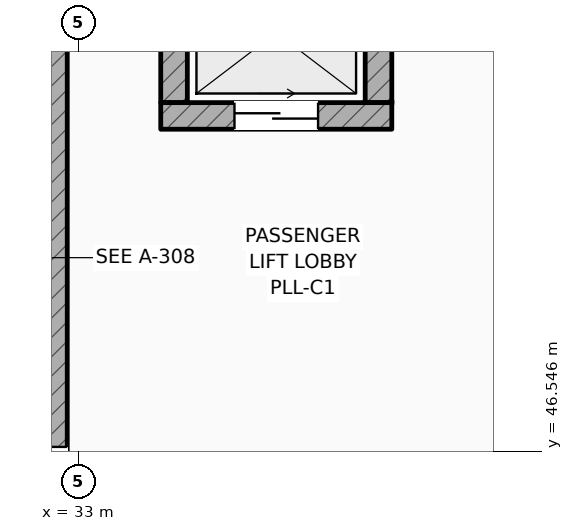
"""IFC4 building model, lengths in metres.
Left out: names, types, materials, properties, quantities, classifications, styles, units other than length and angle.
Written with IfcOpenShell. Run it as: python <this file> out.ifc"""

import sys

from ifc_helpers import new_model, si_unit, direction, frame, frame_2d, origin, place, context, subcontext, project, spatial, rectangle, extrude, element, fill, save


model = new_model("IFC4")
c1 = context("Model", 3, precision=1e-05, world=origin(), true_north=direction((0.0, 1.0)))
c2 = subcontext(c1, "Body", "Model", "MODEL_VIEW")
j1 = project(units=[si_unit("LENGTHUNIT", "METRE"), si_unit("PLANEANGLEUNIT", "RADIAN")], contexts=[c1])
p1 = place(None, origin())
s1 = spatial("IfcSite", under=j1, at=p1, CompositionType="ELEMENT")
p2 = place(p1, origin())
s2 = spatial("IfcBuilding", under=s1, at=p2, CompositionType="ELEMENT")
p3 = place(p2, frame((0.0, 0.0, -4.5)))
s3 = spatial("IfcBuildingStorey", under=s2, at=p3, CompositionType="ELEMENT", Elevation=-4.5)
p4 = place(p3, frame((32.675, 44.75, 0.0), z_axis=(0.0, 0.0, 1.0), x_axis=(0.0, 1.0, 0.0)))
e1 = element("IfcWall", 1, at=p4, inside=s3, PredefinedType="SHEAR", context=c2, shape_type="SweptSolid", body=[
    extrude(rectangle(XDim=8.68, YDim=0.35, at=frame_2d((4.34, 0.0))), origin(), (0.0, 0.0, 1.0), 4.5),
])
p5 = place(p4, frame((0.25, 0.0, 0.0)))
e2 = element("IfcOpeningElement", 2, at=p5, cuts=e1, PredefinedType="OPENING", context=c2, shape_type="SweptSolid", body=[
    extrude(rectangle(XDim=1.6, YDim=2.2, at=frame_2d((0.8, 1.1))), frame((0.0, 0.185, 0.0), z_axis=(0.0, -1.0, 0.0), x_axis=(1.0, 0.0, 0.0)), (0.0, 0.0, 1.0), 0.37),
])
p6 = place(p3, frame((34.08, 50.955, 0.0), z_axis=(0.0, 0.0, 1.0), x_axis=(1.0, 0.0, 0.0)))
e3 = element("IfcWall", 3, at=p6, inside=s3, PredefinedType="SHEAR", context=c2, shape_type="SweptSolid", body=[
    extrude(rectangle(XDim=3.04, YDim=0.35, at=frame_2d((1.52, 0.0))), origin(), (0.0, 0.0, 1.0), 4.1),
])
p7 = place(p6, frame((0.97, 0.0, 0.0)))
e4 = element("IfcOpeningElement", 4, at=p7, cuts=e3, PredefinedType="OPENING", context=c2, shape_type="SweptSolid", body=[
    extrude(rectangle(XDim=1.1, YDim=2.2, at=frame_2d((0.55, 1.1))), frame((0.0, 0.185, 0.0), z_axis=(0.0, -1.0, 0.0), x_axis=(1.0, 0.0, 0.0)), (0.0, 0.0, 1.0), 0.37),
])
for number, where, z_axis, x_axis in (
    (5, (34.255, 51.13, 0.0), (0.0, 0.0, 1.0), (0.0, 1.0, 0.0)),
    (6, (36.945, 51.13, 0.0), (0.0, 0.0, 1.0), (0.0, 1.0, 0.0)),
):
    element("IfcWall", number, at=place(p3, frame(where, z_axis=z_axis, x_axis=x_axis)), inside=s3, PredefinedType="SHEAR", context=c2, shape_type="SweptSolid", body=[
        extrude(rectangle(XDim=1.84, YDim=0.35, at=frame_2d((0.92, 0.0))), origin(), (0.0, 0.0, 1.0), 4.1),
    ])
p8 = place(p5, origin())
e7 = element("IfcDoor", 7, at=p8, inside=s3, OperationType="SINGLE_SWING_LEFT", PredefinedType="DOOR", context=c2, shape_type="SweptSolid", body=[
    extrude(rectangle(XDim=1.6, YDim=2.2, at=frame_2d((0.8, 1.1))), frame((0.0, 0.025, 0.0), z_axis=(0.0, -1.0, 0.0), x_axis=(1.0, 0.0, 0.0)), (0.0, 0.0, 1.0), 0.05),
])
fill(e2, e7)
p9 = place(p7, origin())
e8 = element("IfcDoor", 8, at=p9, inside=s3, OperationType="SLIDING_TO_LEFT", PredefinedType="DOOR", context=c2, shape_type="SweptSolid", body=[
    extrude(rectangle(XDim=1.1, YDim=2.2, at=frame_2d((0.55, 1.1))), frame((0.0, 0.025, 0.0), z_axis=(0.0, -1.0, 0.0), x_axis=(1.0, 0.0, 0.0)), (0.0, 0.0, 1.0), 0.05),
])
fill(e4, e8)
save(model, sys.argv[1])
